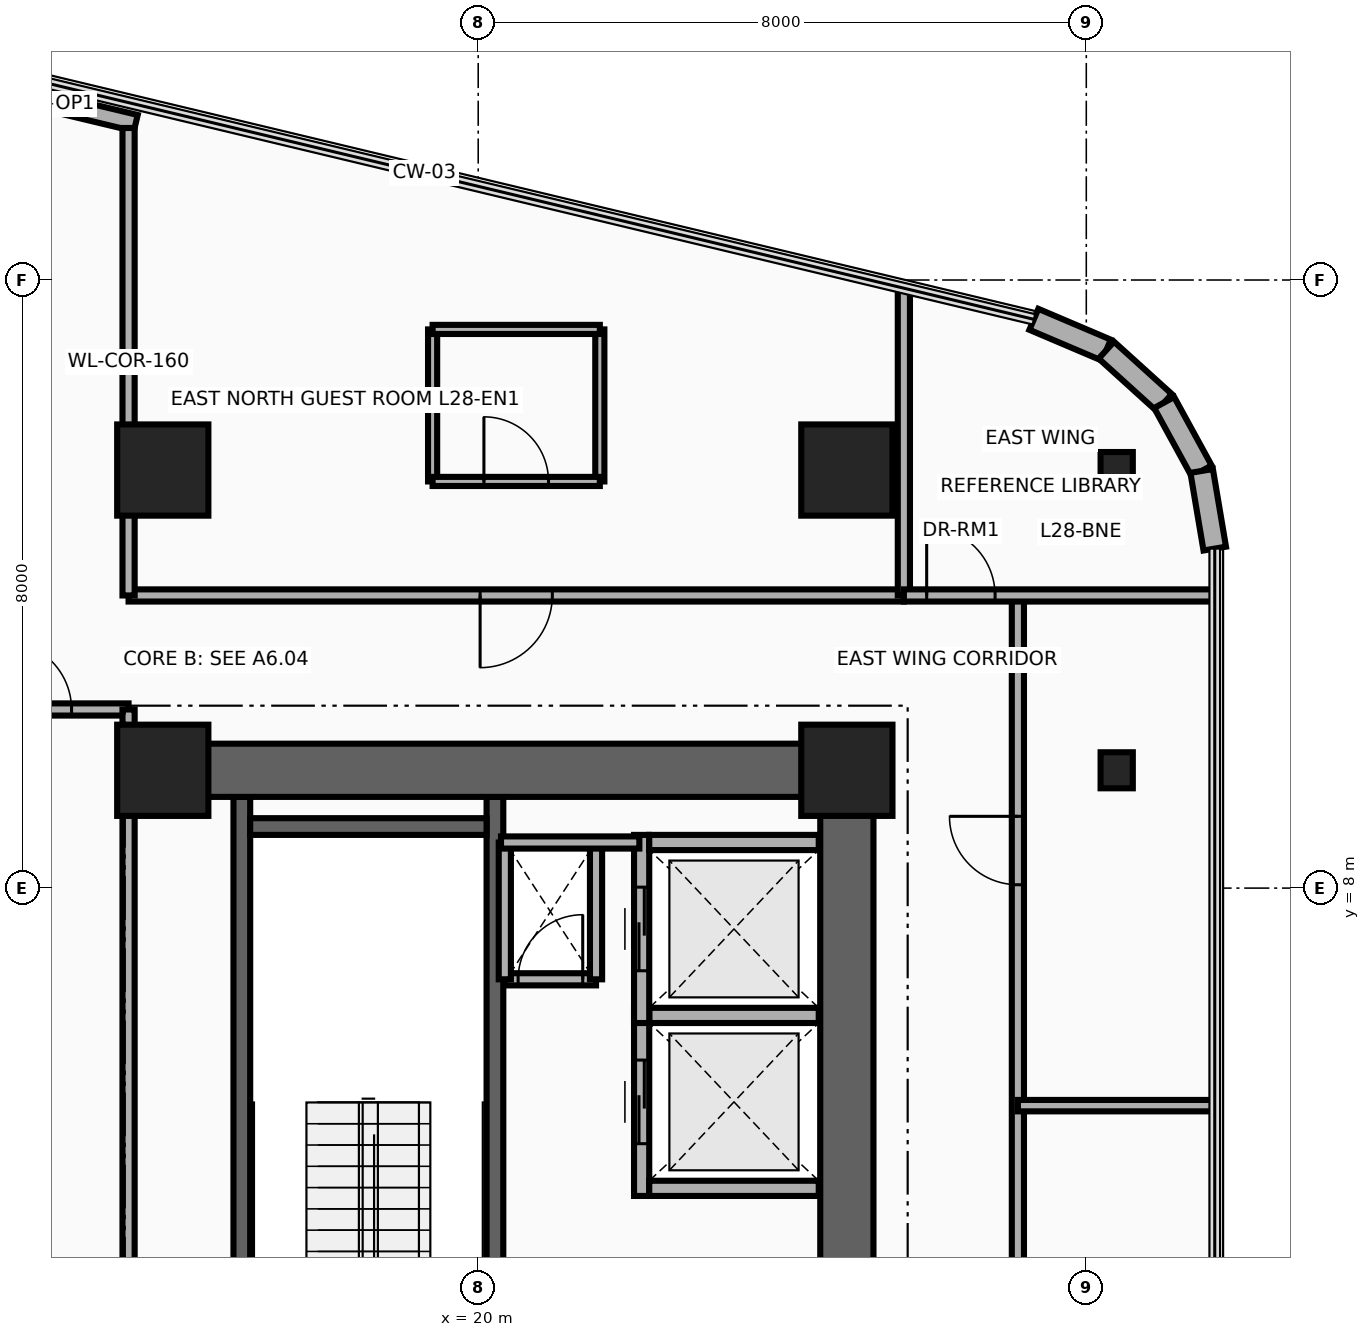
"""IFC4 building model, lengths in metres.
Left out: names, types, materials, properties, quantities, classifications, styles, units other than length and angle.
Written with IfcOpenShell. Run it as: python <this file> out.ifc"""

import sys

from ifc_helpers import new_model, si_unit, direction, frame, frame_2d, origin, origin_2d, place, context, subcontext, project, spatial, rectangle, i_section, extrude, source, transform, mapped, element, fill, save


model = new_model("IFC4")
c1 = context("Model", 3, precision=1e-05, world=origin(), true_north=direction((0.0, 1.0)))
c2 = subcontext(c1, "Body", "Model", "MODEL_VIEW")
j1 = project(units=[si_unit("LENGTHUNIT", "METRE"), si_unit("PLANEANGLEUNIT", "RADIAN")], contexts=[c1])
p1 = place(None, origin())
s1 = spatial("IfcSite", under=j1, at=p1, CompositionType="ELEMENT")
p2 = place(p1, origin())
s2 = spatial("IfcBuilding", under=s1, at=p2, CompositionType="ELEMENT")
p3 = place(p2, frame((0.0, 0.0, 113.1)))
s3 = spatial("IfcBuildingStorey", under=s2, at=p3, CompositionType="ELEMENT", Elevation=113.1)
for number, where, z_axis, x_axis in (
    (1, (16.89, 0.68, 0.0), (0.0, 0.0, 1.0), (0.0, 1.0, 0.0)),
    (2, (20.22, 0.68, 0.0), (0.0, 0.0, 1.0), (0.0, 1.0, 0.0)),
):
    element("IfcWall", number, at=place(p3, frame(where, z_axis=z_axis, x_axis=x_axis)), inside=s3, PredefinedType="SHEAR", context=c2, shape_type="SweptSolid", body=[
        extrude(rectangle(XDim=8.52, YDim=0.22, at=frame_2d((4.26, 0.0))), origin(), (0.0, 0.0, 1.0), 3.46),
    ])
p4 = place(p3, frame((17.0, 8.81, 0.0), z_axis=(0.0, 0.0, 1.0), x_axis=(1.0, 0.0, 0.0)))
e3 = element("IfcWall", 3, at=p4, inside=s3, PredefinedType="SHEAR", context=c2, shape_type="SweptSolid", body=[
    extrude(rectangle(XDim=3.11, YDim=0.22, at=frame_2d((1.555, 0.0))), origin(), (0.0, 0.0, 1.0), 3.46),
])
p5 = place(p3, frame((24.85, 0.95, 0.0), z_axis=(0.0, 0.0, 1.0), x_axis=(0.0, 1.0, 0.0)))
e4 = element("IfcWall", 4, at=p5, inside=s3, PredefinedType="SHEAR", context=c2, shape_type="SweptSolid", body=[
    extrude(rectangle(XDim=8.95, YDim=0.7, at=frame_2d((4.475, 0.0))), origin(), (0.0, 0.0, 1.0), 3.46),
])
p6 = place(p3, frame((15.85, 9.55, 0.0), z_axis=(0.0, 0.0, 1.0), x_axis=(1.0, 0.0, 0.0)))
e5 = element("IfcWall", 5, at=p6, inside=s3, PredefinedType="SHEAR", context=c2, shape_type="SweptSolid", body=[
    extrude(rectangle(XDim=9.0, YDim=0.7, at=frame_2d((4.5, 0.0))), origin(), (0.0, 0.0, 1.0), 3.46),
])
m1 = source(origin(), c2, "Body", "SweptSolid", [
    extrude(rectangle(XDim=1.2, YDim=1.2, at=origin_2d()), origin(), (0.0, 0.0, 1.0), 3.7),
])
for number, where, z_axis, x_axis in (
    (6, (15.85, 9.55, 0.0), (0.0, 0.0, 1.0), (1.0, 0.0, 0.0)),
    (7, (24.85, 9.55, 0.0), (0.0, 0.0, 1.0), (1.0, 0.0, 0.0)),
):
    element("IfcColumn", number, at=place(p3, frame(where, z_axis=z_axis, x_axis=x_axis)), inside=s3, PredefinedType="COLUMN", context=c2, shape_type="MappedRepresentation", body=[
        mapped(m1, transform((0.0, 0.0, 0.0), x_axis=(1.0, 0.0, 0.0), y_axis=(0.0, 1.0, 0.0), z_axis=(0.0, 0.0, 1.0), scale=1.0)),
    ])
m2 = source(origin(), c2, "Body", "SweptSolid", [
    extrude(i_section(OverallWidth=0.424, OverallDepth=0.474, WebThickness=0.048, FlangeThickness=0.077, at=origin_2d()), origin(), (0.0, 0.0, 1.0), 3.7),
])
p7 = place(p3, frame((28.4, 9.55, 0.0), z_axis=(0.0, 0.0, 1.0), x_axis=(1.0, 0.0, 0.0)))
e8 = element("IfcColumn", 8, at=p7, inside=s3, PredefinedType="COLUMN", context=c2, shape_type="MappedRepresentation", body=[
    mapped(m2, transform((0.0, 0.0, 0.0), x_axis=(1.0, 0.0, 0.0), y_axis=(0.0, 1.0, 0.0), z_axis=(0.0, 0.0, 1.0), scale=1.0)),
])
for number, where, z_axis, x_axis in (
    (9, (15.85, 13.5, 0.0), (0.0, 0.0, 1.0), (1.0, 0.0, 0.0)),
    (10, (24.85, 13.5, 0.0), (0.0, 0.0, 1.0), (1.0, 0.0, 0.0)),
):
    element("IfcColumn", number, at=place(p3, frame(where, z_axis=z_axis, x_axis=x_axis)), inside=s3, PredefinedType="COLUMN", context=c2, shape_type="MappedRepresentation", body=[
        mapped(m1, transform((0.0, 0.0, 0.0), x_axis=(1.0, 0.0, 0.0), y_axis=(0.0, 1.0, 0.0), z_axis=(0.0, 0.0, 1.0), scale=1.0)),
    ])
p8 = place(p3, frame((28.4, 13.5, 0.0), z_axis=(0.0, 0.0, 1.0), x_axis=(1.0, 0.0, 0.0)))
e11 = element("IfcColumn", 11, at=p8, inside=s3, PredefinedType="COLUMN", context=c2, shape_type="MappedRepresentation", body=[
    mapped(m2, transform((0.0, 0.0, 0.0), x_axis=(1.0, 0.0, 0.0), y_axis=(0.0, 1.0, 0.0), z_axis=(0.0, 0.0, 1.0), scale=1.0)),
])
p9 = place(p3, frame((13.355, 18.576, 0.0), z_axis=(0.0, 0.0, 1.0), x_axis=(0.97252211384, -0.232810519721, 0.0)))
e12 = element("IfcWall", 12, at=p9, inside=s3, PredefinedType="SOLIDWALL", context=c2, shape_type="SweptSolid", body=[
    extrude(rectangle(XDim=2.2, YDim=0.22, at=frame_2d((1.1, 0.0))), origin(), (0.0, 0.0, 1.0), 3.46),
])
p10 = place(p9, frame((0.65, 0.0, 0.95)))
e13 = element("IfcOpeningElement", 13, at=p10, cuts=e12, PredefinedType="OPENING", context=c2, shape_type="SweptSolid", body=[
    extrude(rectangle(XDim=0.9, YDim=1.3, at=frame_2d((0.45, 0.65))), frame((0.0, 0.125, 0.0), z_axis=(0.0, -1.0, 0.0), x_axis=(1.0, 0.0, 0.0)), (0.0, 0.0, 1.0), 0.25),
])
p11 = place(p3, frame((27.31, 15.483, 0.0), z_axis=(0.0, 0.0, 1.0), x_axis=(0.920250328759, -0.391330208927, 0.0)))
e14 = element("IfcWall", 14, at=p11, inside=s3, PredefinedType="SOLIDWALL", context=c2, shape_type="SweptSolid", body=[
    extrude(rectangle(XDim=1.036, YDim=0.3, at=frame_2d((0.518, 0.0))), origin(), (0.0, 0.0, 1.0), 3.46),
])
p12 = place(p3, frame((28.264, 15.077, 0.0), z_axis=(0.0, 0.0, 1.0), x_axis=(0.741208839713, -0.671274501178, 0.0)))
e15 = element("IfcWall", 15, at=p12, inside=s3, PredefinedType="SOLIDWALL", context=c2, shape_type="SweptSolid", body=[
    extrude(rectangle(XDim=1.026, YDim=0.3, at=frame_2d((0.513, 0.0))), origin(), (0.0, 0.0, 1.0), 3.46),
])
p13 = place(p3, frame((29.025, 14.388, 0.0), z_axis=(0.0, 0.0, 1.0), x_axis=(0.480284137298, -0.87711296163, 0.0)))
e16 = element("IfcWall", 16, at=p13, inside=s3, PredefinedType="SOLIDWALL", context=c2, shape_type="SweptSolid", body=[
    extrude(rectangle(XDim=1.027, YDim=0.3, at=frame_2d((0.513, 0.0))), origin(), (0.0, 0.0, 1.0), 3.46),
])
p14 = place(p3, frame((29.518, 13.488, 0.0), z_axis=(0.0, 0.0, 1.0), x_axis=(0.166156796952, -0.986099345313, 0.0)))
e17 = element("IfcWall", 17, at=p14, inside=s3, PredefinedType="SOLIDWALL", context=c2, shape_type="SweptSolid", body=[
    extrude(rectangle(XDim=1.036, YDim=0.3, at=frame_2d((0.518, 0.0))), origin(), (0.0, 0.0, 1.0), 3.46),
])
p15 = place(p3, frame((22.15, 3.95, 0.0), z_axis=(0.0, 0.0, 1.0), x_axis=(0.0, 1.0, 0.0)))
e18 = element("IfcWall", 18, at=p15, inside=s3, PredefinedType="MOVABLE", context=c2, shape_type="SweptSolid", body=[
    extrude(rectangle(XDim=2.475, YDim=0.2, at=frame_2d((1.238, 0.0))), origin(), (0.0, 0.0, 1.0), 3.46),
])
p16 = place(p15, frame((0.688, 0.0, 0.0)))
e19 = element("IfcOpeningElement", 19, at=p16, cuts=e18, PredefinedType="OPENING", context=c2, shape_type="SweptSolid", body=[
    extrude(rectangle(XDim=1.1, YDim=2.1, at=frame_2d((0.55, 1.05))), frame((0.0, 0.115, 0.0), z_axis=(0.0, -1.0, 0.0), x_axis=(1.0, 0.0, 0.0)), (0.0, 0.0, 1.0), 0.23),
])
for number, where, z_axis, x_axis in (
    (20, (22.25, 4.05, 0.0), (0.0, 0.0, 1.0), (1.0, 0.0, 0.0)),
    (21, (22.25, 6.325, 0.0), (0.0, 0.0, 1.0), (1.0, 0.0, 0.0)),
):
    element("IfcWall", number, at=place(p3, frame(where, z_axis=z_axis, x_axis=x_axis)), inside=s3, PredefinedType="MOVABLE", context=c2, shape_type="SweptSolid", body=[
        extrude(rectangle(XDim=2.23, YDim=0.2, at=frame_2d((1.115, 0.0))), origin(), (0.0, 0.0, 1.0), 2.245),
    ])
p17 = place(p3, frame((22.15, 6.225, 0.0), z_axis=(0.0, 0.0, 1.0), x_axis=(0.0, 1.0, 0.0)))
e22 = element("IfcWall", 22, at=p17, inside=s3, PredefinedType="MOVABLE", context=c2, shape_type="SweptSolid", body=[
    extrude(rectangle(XDim=2.475, YDim=0.2, at=frame_2d((1.237, 0.0))), origin(), (0.0, 0.0, 1.0), 3.46),
])
p18 = place(p17, frame((0.688, 0.0, 0.0)))
e23 = element("IfcOpeningElement", 23, at=p18, cuts=e22, PredefinedType="OPENING", context=c2, shape_type="SweptSolid", body=[
    extrude(rectangle(XDim=1.1, YDim=2.1, at=frame_2d((0.55, 1.05))), frame((0.0, 0.115, 0.0), z_axis=(0.0, -1.0, 0.0), x_axis=(1.0, 0.0, 0.0)), (0.0, 0.0, 1.0), 0.23),
])
p19 = place(p3, frame((22.25, 8.6, 0.0), z_axis=(0.0, 0.0, 1.0), x_axis=(1.0, 0.0, 0.0)))
e24 = element("IfcWall", 24, at=p19, inside=s3, PredefinedType="MOVABLE", context=c2, shape_type="SweptSolid", body=[
    extrude(rectangle(XDim=2.23, YDim=0.2, at=frame_2d((1.115, 0.0))), origin(), (0.0, 0.0, 1.0), 2.245),
])
p20 = place(p3, frame((20.35, 6.8, 0.0), z_axis=(0.0, 0.0, 1.0), x_axis=(1.0, 0.0, 0.0)))
e25 = element("IfcWall", 25, at=p20, inside=s3, PredefinedType="PARTITIONING", context=c2, shape_type="SweptSolid", body=[
    extrude(rectangle(XDim=1.2, YDim=0.16, at=frame_2d((0.6, 0.0))), origin(), (0.0, 0.0, 1.0), 3.46),
])
p21 = place(p20, frame((0.175, 0.0, 0.0)))
e26 = element("IfcOpeningElement", 26, at=p21, cuts=e25, PredefinedType="OPENING", context=c2, shape_type="SweptSolid", body=[
    extrude(rectangle(XDim=0.85, YDim=2.05, at=frame_2d((0.425, 1.025))), frame((0.0, 0.095, 0.0), z_axis=(0.0, -1.0, 0.0), x_axis=(1.0, 0.0, 0.0)), (0.0, 0.0, 1.0), 0.19),
])
for number, where, z_axis, x_axis in (
    (27, (21.55, 6.8, 0.0), (0.0, 0.0, 1.0), (0.0, 1.0, 0.0)),
    (28, (20.35, 6.8, 0.0), (0.0, 0.0, 1.0), (0.0, 1.0, 0.0)),
):
    element("IfcWall", number, at=place(p3, frame(where, z_axis=z_axis, x_axis=x_axis)), inside=s3, PredefinedType="PARTITIONING", context=c2, shape_type="SweptSolid", body=[
        extrude(rectangle(XDim=1.8, YDim=0.16, at=frame_2d((0.9, 0.0))), origin(), (0.0, 0.0, 1.0), 3.46),
    ])
p22 = place(p3, frame((20.3, 8.6, 0.0), z_axis=(0.0, 0.0, 1.0), x_axis=(1.0, 0.0, 0.0)))
e29 = element("IfcWall", 29, at=p22, inside=s3, PredefinedType="PARTITIONING", context=c2, shape_type="SweptSolid", body=[
    extrude(rectangle(XDim=1.82, YDim=0.16, at=frame_2d((0.91, 0.0))), origin(), (0.0, 0.0, 1.0), 3.46),
])
p23 = place(p3, frame((15.4, 11.85, 0.0), z_axis=(0.0, 0.0, 1.0), x_axis=(1.0, 0.0, 0.0)))
e30 = element("IfcWall", 30, at=p23, inside=s3, PredefinedType="PARTITIONING", context=c2, shape_type="SweptSolid", body=[
    extrude(rectangle(XDim=10.2, YDim=0.16, at=frame_2d((5.1, 0.0))), origin(), (0.0, 0.0, 1.0), 2.834),
])
p24 = place(p23, frame((4.625, 0.0, 0.0)))
e31 = element("IfcOpeningElement", 31, at=p24, cuts=e30, PredefinedType="OPENING", context=c2, shape_type="SweptSolid", body=[
    extrude(rectangle(XDim=0.95, YDim=2.15, at=frame_2d((0.475, 1.075))), frame((0.0, 0.095, 0.0), z_axis=(0.0, -1.0, 0.0), x_axis=(1.0, 0.0, 0.0)), (0.0, 0.0, 1.0), 0.19),
])
p25 = place(p3, frame((15.4, 11.85, 0.0), z_axis=(0.0, 0.0, 1.0), x_axis=(0.0, 1.0, 0.0)))
e32 = element("IfcWall", 32, at=p25, inside=s3, PredefinedType="PARTITIONING", context=c2, shape_type="SweptSolid", body=[
    extrude(rectangle(XDim=6.15, YDim=0.16, at=frame_2d((3.075, 0.0))), origin(), (0.0, 0.0, 1.0), 2.666),
])
p26 = place(p3, frame((25.6, 11.85, 0.0), z_axis=(0.0, 0.0, 1.0), x_axis=(0.0, 1.0, 0.0)))
e33 = element("IfcWall", 33, at=p26, inside=s3, PredefinedType="PARTITIONING", context=c2, shape_type="SweptSolid", body=[
    extrude(rectangle(XDim=4.042, YDim=0.16, at=frame_2d((2.021, 0.0))), origin(), (0.0, 0.0, 1.0), 2.666),
])
for number, where, z_axis, x_axis in (
    (34, (19.4, 13.35, 0.0), (0.0, 0.0, 1.0), (0.0, 1.0, 0.0)),
    (35, (21.6, 13.35, 0.0), (0.0, 0.0, 1.0), (0.0, 1.0, 0.0)),
):
    element("IfcWall", number, at=place(p3, frame(where, z_axis=z_axis, x_axis=x_axis)), inside=s3, PredefinedType="PARTITIONING", context=c2, shape_type="SweptSolid", body=[
        extrude(rectangle(XDim=2.0, YDim=0.12, at=frame_2d((1.0, 0.0))), origin(), (0.0, 0.0, 1.0), 2.666),
    ])
p27 = place(p3, frame((19.4, 15.35, 0.0), z_axis=(0.0, 0.0, 1.0), x_axis=(1.0, 0.0, 0.0)))
e36 = element("IfcWall", 36, at=p27, inside=s3, PredefinedType="PARTITIONING", context=c2, shape_type="SweptSolid", body=[
    extrude(rectangle(XDim=2.2, YDim=0.12, at=frame_2d((1.1, 0.0))), origin(), (0.0, 0.0, 1.0), 3.46),
])
p28 = place(p3, frame((19.4, 13.35, 0.0), z_axis=(0.0, 0.0, 1.0), x_axis=(1.0, 0.0, 0.0)))
e37 = element("IfcWall", 37, at=p28, inside=s3, PredefinedType="PARTITIONING", context=c2, shape_type="SweptSolid", body=[
    extrude(rectangle(XDim=2.2, YDim=0.12, at=frame_2d((1.1, 0.0))), origin(), (0.0, 0.0, 1.0), 2.666),
])
p29 = place(p28, frame((0.675, 0.0, 0.0)))
e38 = element("IfcOpeningElement", 38, at=p29, cuts=e37, PredefinedType="OPENING", context=c2, shape_type="SweptSolid", body=[
    extrude(rectangle(XDim=0.85, YDim=2.1, at=frame_2d((0.425, 1.05))), frame((0.0, 0.075, 0.0), z_axis=(0.0, -1.0, 0.0), x_axis=(1.0, 0.0, 0.0)), (0.0, 0.0, 1.0), 0.15),
])
p30 = place(p3, frame((27.1, -11.661, 0.0), z_axis=(0.0, 0.0, 1.0), x_axis=(0.0, 1.0, 0.0)))
e39 = element("IfcWall", 39, at=p30, inside=s3, PredefinedType="PARTITIONING", context=c2, shape_type="SweptSolid", body=[
    extrude(rectangle(XDim=23.511, YDim=0.16, at=frame_2d((11.755, 0.0))), origin(), (0.0, 0.0, 1.0), 2.666),
])
p31 = place(p30, frame((0.8, 0.0, 0.0)))
e40 = element("IfcOpeningElement", 40, at=p31, cuts=e39, PredefinedType="OPENING", context=c2, shape_type="SweptSolid", body=[
    extrude(rectangle(XDim=0.9, YDim=2.1, at=frame_2d((0.45, 1.05))), frame((0.0, 0.095, 0.0), z_axis=(0.0, -1.0, 0.0), x_axis=(1.0, 0.0, 0.0)), (0.0, 0.0, 1.0), 0.19),
])
p32 = place(p30, frame((6.28, 0.0, 0.0)))
e41 = element("IfcOpeningElement", 41, at=p32, cuts=e39, PredefinedType="OPENING", context=c2, shape_type="SweptSolid", body=[
    extrude(rectangle(XDim=0.9, YDim=2.1, at=frame_2d((0.45, 1.05))), frame((0.0, 0.095, 0.0), z_axis=(0.0, -1.0, 0.0), x_axis=(1.0, 0.0, 0.0)), (0.0, 0.0, 1.0), 0.19),
])
p33 = place(p30, frame((12.992, 0.0, 0.0)))
e42 = element("IfcOpeningElement", 42, at=p33, cuts=e39, PredefinedType="OPENING", context=c2, shape_type="SweptSolid", body=[
    extrude(rectangle(XDim=0.9, YDim=2.1, at=frame_2d((0.45, 1.05))), frame((0.0, 0.095, 0.0), z_axis=(0.0, -1.0, 0.0), x_axis=(1.0, 0.0, 0.0)), (0.0, 0.0, 1.0), 0.19),
])
p34 = place(p30, frame((19.705, 0.0, 0.0)))
e43 = element("IfcOpeningElement", 43, at=p34, cuts=e39, PredefinedType="OPENING", context=c2, shape_type="SweptSolid", body=[
    extrude(rectangle(XDim=0.9, YDim=2.1, at=frame_2d((0.45, 1.05))), frame((0.0, 0.095, 0.0), z_axis=(0.0, -1.0, 0.0), x_axis=(1.0, 0.0, 0.0)), (0.0, 0.0, 1.0), 0.19),
])
p35 = place(p3, frame((25.6, 11.85, 0.0), z_axis=(0.0, 0.0, 1.0), x_axis=(1.0, 0.0, 0.0)))
e44 = element("IfcWall", 44, at=p35, inside=s3, PredefinedType="PARTITIONING", context=c2, shape_type="SweptSolid", body=[
    extrude(rectangle(XDim=4.09, YDim=0.16, at=frame_2d((2.045, 0.0))), origin(), (0.0, 0.0, 1.0), 2.896),
])
p36 = place(p35, frame((0.3, 0.0, 0.0)))
e45 = element("IfcOpeningElement", 45, at=p36, cuts=e44, PredefinedType="OPENING", context=c2, shape_type="SweptSolid", body=[
    extrude(rectangle(XDim=0.9, YDim=2.1, at=frame_2d((0.45, 1.05))), frame((0.0, 0.095, 0.0), z_axis=(0.0, -1.0, 0.0), x_axis=(1.0, 0.0, 0.0)), (0.0, 0.0, 1.0), 0.19),
])
p37 = place(p3, frame((27.1, 5.138, 0.0), z_axis=(0.0, 0.0, 1.0), x_axis=(1.0, 0.0, 0.0)))
e46 = element("IfcWall", 46, at=p37, inside=s3, PredefinedType="PARTITIONING", context=c2, shape_type="SweptSolid", body=[
    extrude(rectangle(XDim=2.59, YDim=0.15, at=frame_2d((1.295, 0.0))), origin(), (0.0, 0.0, 1.0), 2.896),
])
p38 = place(p3, frame((13.3, 10.35, 0.0), z_axis=(0.0, 0.0, 1.0), x_axis=(1.0, 0.0, 0.0)))
e47 = element("IfcWall", 47, at=p38, inside=s3, PredefinedType="PARTITIONING", context=c2, shape_type="SweptSolid", body=[
    extrude(rectangle(XDim=2.1, YDim=0.16, at=frame_2d((1.05, 0.0))), origin(), (0.0, 0.0, 1.0), 2.666),
])
p39 = place(p38, frame((0.45, 0.0, 0.0)))
e48 = element("IfcOpeningElement", 48, at=p39, cuts=e47, PredefinedType="OPENING", context=c2, shape_type="SweptSolid", body=[
    extrude(rectangle(XDim=0.9, YDim=2.1, at=frame_2d((0.45, 1.05))), frame((0.0, 0.095, 0.0), z_axis=(0.0, -1.0, 0.0), x_axis=(1.0, 0.0, 0.0)), (0.0, 0.0, 1.0), 0.19),
])
p40 = place(p3, frame((15.4, 1.0, 0.0), z_axis=(0.0, 0.0, 1.0), x_axis=(0.0, 1.0, 0.0)))
e49 = element("IfcWall", 49, at=p40, inside=s3, PredefinedType="PARTITIONING", context=c2, shape_type="SweptSolid", body=[
    extrude(rectangle(XDim=9.35, YDim=0.16, at=frame_2d((4.675, 0.0))), origin(), (0.0, 0.0, 1.0), 2.245),
])
p41 = place(p10, origin())
e50 = element("IfcWindow", 50, at=p41, inside=s3, PartitioningType="SINGLE_PANEL", PredefinedType="WINDOW", context=c2, shape_type="SweptSolid", body=[
    extrude(rectangle(XDim=0.9, YDim=1.3, at=frame_2d((0.45, 0.65))), frame((0.0, 0.03, 0.0), z_axis=(0.0, -1.0, 0.0), x_axis=(1.0, 0.0, 0.0)), (0.0, 0.0, 1.0), 0.06),
])
fill(e13, e50)
p42 = place(p16, origin())
e51 = element("IfcDoor", 51, at=p42, inside=s3, OperationType="DOUBLE_DOOR_SLIDING", PredefinedType="DOOR", context=c2, shape_type="SweptSolid", body=[
    extrude(rectangle(XDim=1.1, YDim=2.1, at=frame_2d((0.55, 1.05))), frame((0.0, 0.025, 0.0), z_axis=(0.0, -1.0, 0.0), x_axis=(1.0, 0.0, 0.0)), (0.0, 0.0, 1.0), 0.05),
])
fill(e19, e51)
p43 = place(p18, origin())
e52 = element("IfcDoor", 52, at=p43, inside=s3, OperationType="DOUBLE_DOOR_SLIDING", PredefinedType="DOOR", context=c2, shape_type="SweptSolid", body=[
    extrude(rectangle(XDim=1.1, YDim=2.1, at=frame_2d((0.55, 1.05))), frame((0.0, 0.025, 0.0), z_axis=(0.0, -1.0, 0.0), x_axis=(1.0, 0.0, 0.0)), (0.0, 0.0, 1.0), 0.05),
])
fill(e23, e52)
p44 = place(p21, origin())
e53 = element("IfcDoor", 53, at=p44, inside=s3, OperationType="SINGLE_SWING_RIGHT", PredefinedType="DOOR", context=c2, shape_type="SweptSolid", body=[
    extrude(rectangle(XDim=0.85, YDim=2.05, at=frame_2d((0.425, 1.025))), frame((0.0, 0.025, 0.0), z_axis=(0.0, -1.0, 0.0), x_axis=(1.0, 0.0, 0.0)), (0.0, 0.0, 1.0), 0.05),
])
fill(e26, e53)
p45 = place(p24, frame((0.95, 0.0, 0.0), z_axis=(0.0, 0.0, 1.0), x_axis=(-1.0, 0.0, 0.0)))
e54 = element("IfcDoor", 54, at=p45, inside=s3, OperationType="SINGLE_SWING_LEFT", PredefinedType="DOOR", context=c2, shape_type="SweptSolid", body=[
    extrude(rectangle(XDim=0.95, YDim=2.15, at=frame_2d((0.475, 1.075))), frame((0.0, 0.025, 0.0), z_axis=(0.0, -1.0, 0.0), x_axis=(1.0, 0.0, 0.0)), (0.0, 0.0, 1.0), 0.05),
])
fill(e31, e54)
p46 = place(p29, origin())
e55 = element("IfcDoor", 55, at=p46, inside=s3, OperationType="SINGLE_SWING_RIGHT", PredefinedType="DOOR", context=c2, shape_type="SweptSolid", body=[
    extrude(rectangle(XDim=0.85, YDim=2.1, at=frame_2d((0.425, 1.05))), frame((0.0, 0.025, 0.0), z_axis=(0.0, -1.0, 0.0), x_axis=(1.0, 0.0, 0.0)), (0.0, 0.0, 1.0), 0.05),
])
fill(e38, e55)
p47 = place(p36, origin())
e56 = element("IfcDoor", 56, at=p47, inside=s3, OperationType="SINGLE_SWING_RIGHT", PredefinedType="DOOR", context=c2, shape_type="SweptSolid", body=[
    extrude(rectangle(XDim=0.9, YDim=2.1, at=frame_2d((0.45, 1.05))), frame((0.0, 0.025, 0.0), z_axis=(0.0, -1.0, 0.0), x_axis=(1.0, 0.0, 0.0)), (0.0, 0.0, 1.0), 0.05),
])
fill(e45, e56)
p48 = place(p34, origin())
e57 = element("IfcDoor", 57, at=p48, inside=s3, OperationType="SINGLE_SWING_RIGHT", PredefinedType="DOOR", context=c2, shape_type="SweptSolid", body=[
    extrude(rectangle(XDim=0.9, YDim=2.1, at=frame_2d((0.45, 1.05))), frame((0.0, 0.025, 0.0), z_axis=(0.0, -1.0, 0.0), x_axis=(1.0, 0.0, 0.0)), (0.0, 0.0, 1.0), 0.05),
])
fill(e43, e57)
p49 = place(p39, origin())
e58 = element("IfcDoor", 58, at=p49, inside=s3, OperationType="SINGLE_SWING_LEFT", PredefinedType="DOOR", context=c2, shape_type="SweptSolid", body=[
    extrude(rectangle(XDim=0.9, YDim=2.1, at=frame_2d((0.45, 1.05))), frame((0.0, 0.025, 0.0), z_axis=(0.0, -1.0, 0.0), x_axis=(1.0, 0.0, 0.0)), (0.0, 0.0, 1.0), 0.05),
])
fill(e48, e58)
save(model, sys.argv[1])
